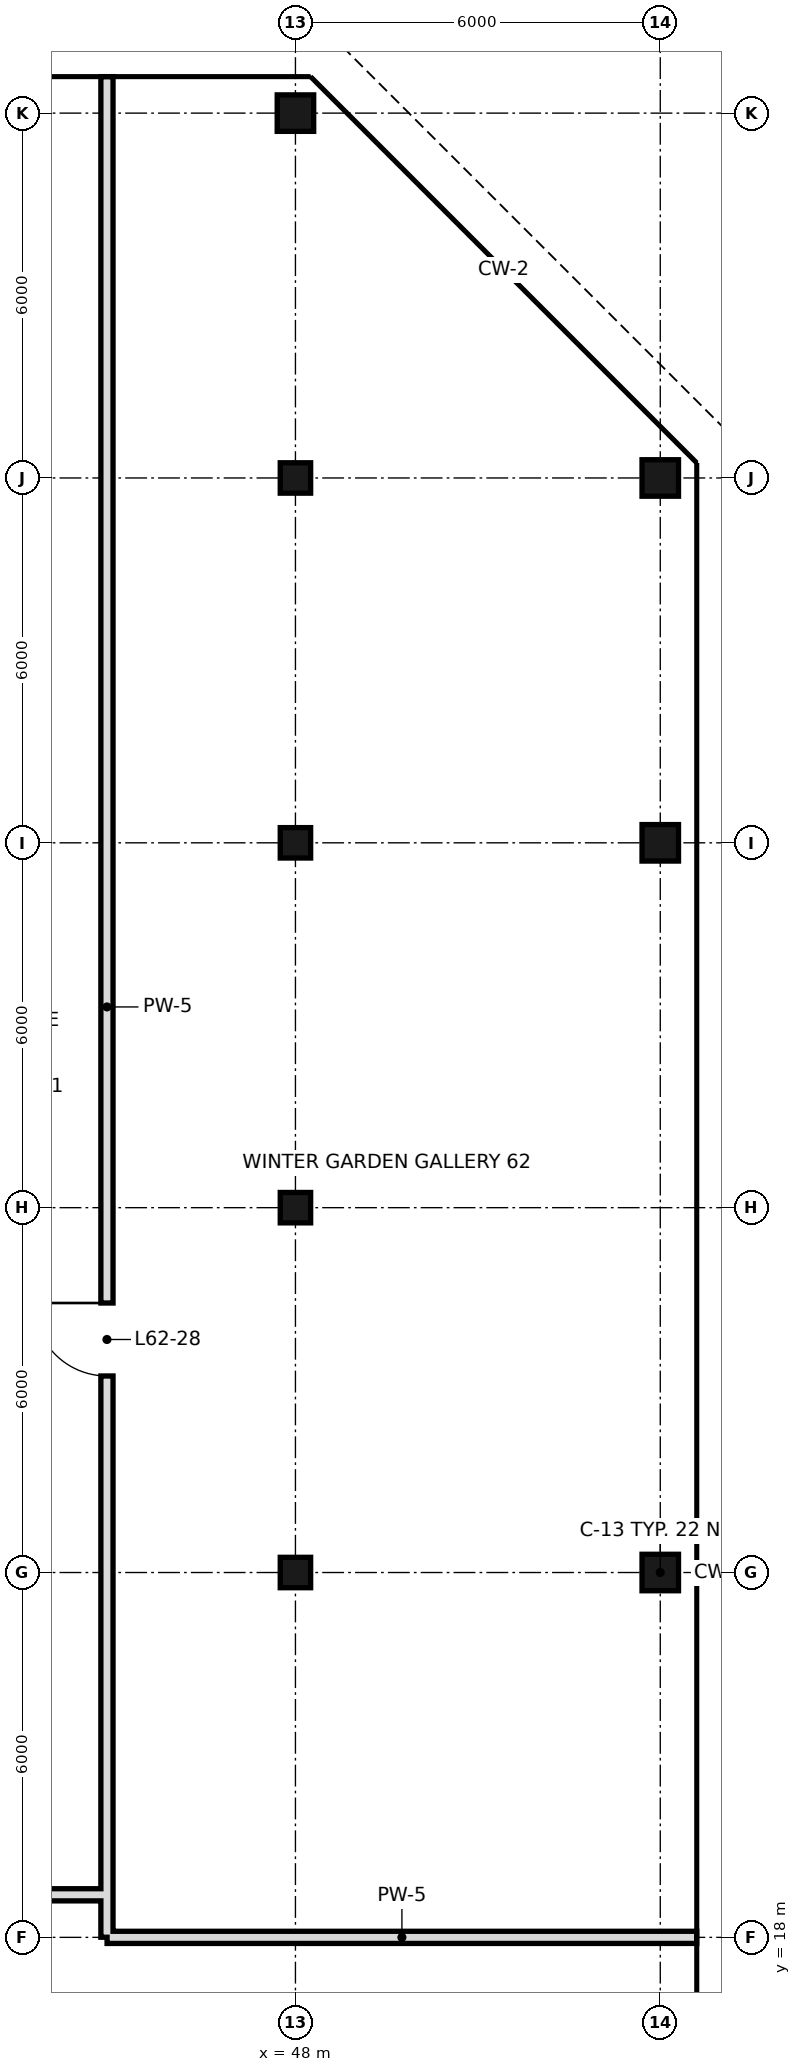
"""IFC4 building model, lengths in metres.
Left out: names, types, materials, properties, quantities, classifications, styles, units other than length and angle.
Written with IfcOpenShell. Run it as: python <this file> out.ifc"""

import sys

from ifc_helpers import new_model, si_unit, direction, frame, frame_2d, origin, origin_2d, place, context, subcontext, project, spatial, rectangle, hollow_rectangle, extrude, element, fill, save


model = new_model("IFC4")
c1 = context("Model", 3, precision=1e-05, world=origin(), true_north=direction((0.0, 1.0)))
c2 = subcontext(c1, "Body", "Model", "MODEL_VIEW")
j1 = project(units=[si_unit("LENGTHUNIT", "METRE"), si_unit("PLANEANGLEUNIT", "RADIAN")], contexts=[c1])
p1 = place(None, origin())
s1 = spatial("IfcSite", under=j1, at=p1, CompositionType="ELEMENT")
p2 = place(p1, origin())
s2 = spatial("IfcBuilding", under=s1, at=p2, CompositionType="ELEMENT")
p3 = place(p2, frame((0.0, 0.0, 263.0)))
s3 = spatial("IfcBuildingStorey", under=s2, at=p3, CompositionType="ELEMENT", Elevation=263.0)
for number, where, z_axis, x_axis in (
    (1, (48.0, 24.0, 0.0), (0.0, 0.0, 1.0), (1.0, 0.0, 0.0)),
    (2, (48.0, 30.0, 0.0), (0.0, 0.0, 1.0), (1.0, 0.0, 0.0)),
    (3, (48.0, 36.0, 0.0), (0.0, 0.0, 1.0), (1.0, 0.0, 0.0)),
    (4, (48.0, 42.0, 0.0), (0.0, 0.0, 1.0), (1.0, 0.0, 0.0)),
):
    element("IfcColumn", number, at=place(p3, frame(where, z_axis=z_axis, x_axis=x_axis)), inside=s3, PredefinedType="COLUMN", context=c2, shape_type="SweptSolid", body=[
        extrude(hollow_rectangle(XDim=0.5, YDim=0.5, WallThickness=0.025, at=origin_2d()), origin(), (0.0, 0.0, 1.0), 3.6),
    ])
for number, where, z_axis, x_axis in (
    (5, (48.0, 48.0, 0.0), (0.0, 0.0, 1.0), (1.0, 0.0, 0.0)),
    (6, (54.0, 24.0, 0.0), (0.0, 0.0, 1.0), (1.0, 0.0, 0.0)),
    (7, (54.0, 36.0, 0.0), (0.0, 0.0, 1.0), (1.0, 0.0, 0.0)),
    (8, (54.0, 42.0, 0.0), (0.0, 0.0, 1.0), (1.0, 0.0, 0.0)),
):
    element("IfcColumn", number, at=place(p3, frame(where, z_axis=z_axis, x_axis=x_axis)), inside=s3, PredefinedType="COLUMN", context=c2, shape_type="SweptSolid", body=[
        extrude(hollow_rectangle(XDim=0.6, YDim=0.6, WallThickness=0.028, at=origin_2d()), origin(), (0.0, 0.0, 1.0), 3.6),
    ])
p4 = place(p3, frame((44.9, 18.002, 0.0), z_axis=(0.0, 0.0, 1.0), x_axis=(0.0, 1.0, 0.0)))
e9 = element("IfcWall", 9, at=p4, inside=s3, PredefinedType="SOLIDWALL", context=c2, shape_type="SweptSolid", body=[
    extrude(rectangle(XDim=30.598, YDim=0.2, at=frame_2d((15.299, 0.0))), origin(), (0.0, 0.0, 1.0), 2.72),
])
p5 = place(p4, frame((9.23, 0.0, 0.0)))
e10 = element("IfcOpeningElement", 10, at=p5, cuts=e9, PredefinedType="OPENING", context=c2, shape_type="SweptSolid", body=[
    extrude(rectangle(XDim=1.2, YDim=2.4, at=frame_2d((0.6, 1.2))), frame((0.0, 0.11, 0.0), z_axis=(0.0, -1.0, 0.0), x_axis=(1.0, 0.0, 0.0)), (0.0, 0.0, 1.0), 0.22),
])
p6 = place(p3, frame((44.902, 18.0, 0.0), z_axis=(0.0, 0.0, 1.0), x_axis=(1.0, 0.0, 0.0)))
e11 = element("IfcWall", 11, at=p6, inside=s3, PredefinedType="SOLIDWALL", context=c2, shape_type="SweptSolid", body=[
    extrude(rectangle(XDim=9.698, YDim=0.2, at=frame_2d((4.849, 0.0))), origin(), (0.0, 0.0, 1.0), 2.72),
])
p7 = place(p3, frame((3.1, 18.7, 0.0), z_axis=(0.0, 0.0, 1.0), x_axis=(1.0, 0.0, 0.0)))
e12 = element("IfcWall", 12, at=p7, inside=s3, PredefinedType="SOLIDWALL", context=c2, shape_type="SweptSolid", body=[
    extrude(rectangle(XDim=41.8, YDim=0.2, at=frame_2d((20.9, 0.0))), origin(), (0.0, 0.0, 1.0), 2.72),
])
p8 = place(p7, frame((5.64, 0.0, 0.0)))
e13 = element("IfcOpeningElement", 13, at=p8, cuts=e12, PredefinedType="OPENING", context=c2, shape_type="SweptSolid", body=[
    extrude(rectangle(XDim=1.2, YDim=2.4, at=frame_2d((0.6, 1.2))), frame((0.0, 0.11, 0.0), z_axis=(0.0, -1.0, 0.0), x_axis=(1.0, 0.0, 0.0)), (0.0, 0.0, 1.0), 0.22),
])
p9 = place(p7, frame((22.53, 0.0, 0.0)))
e14 = element("IfcOpeningElement", 14, at=p9, cuts=e12, PredefinedType="OPENING", context=c2, shape_type="SweptSolid", body=[
    extrude(rectangle(XDim=1.8, YDim=2.4, at=frame_2d((0.9, 1.2))), frame((0.0, 0.11, 0.0), z_axis=(0.0, -1.0, 0.0), x_axis=(1.0, 0.0, 0.0)), (0.0, 0.0, 1.0), 0.22),
])
p10 = place(p5, frame((1.2, 0.0, 0.0), z_axis=(0.0, 0.0, 1.0), x_axis=(-1.0, 0.0, 0.0)))
e15 = element("IfcDoor", 15, at=p10, inside=s3, OperationType="SINGLE_SWING_LEFT", PredefinedType="DOOR", context=c2, shape_type="SweptSolid", body=[
    extrude(rectangle(XDim=1.2, YDim=2.4, at=frame_2d((0.6, 1.2))), frame((0.0, 0.025, 0.0), z_axis=(0.0, -1.0, 0.0), x_axis=(1.0, 0.0, 0.0)), (0.0, 0.0, 1.0), 0.05),
])
fill(e10, e15)
save(model, sys.argv[1])
